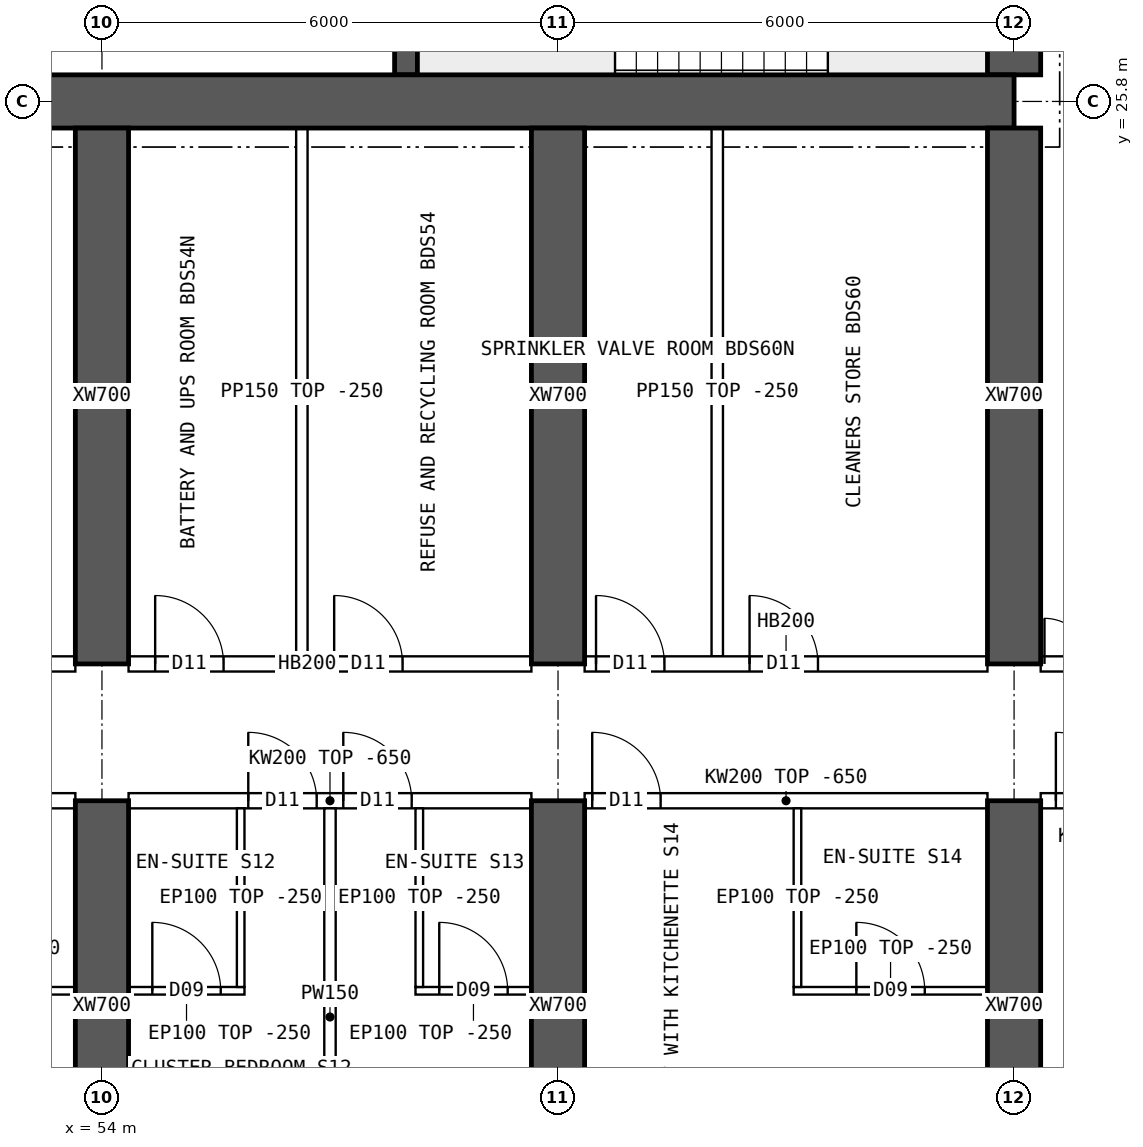
"""IFC4 building model, lengths in metres.
Left out: names, types, materials, properties, quantities, classifications, styles, units other than length and angle.
Written with IfcOpenShell. Run it as: python <this file> out.ifc"""

import sys

from ifc_helpers import new_model, si_unit, direction, frame, frame_2d, origin, place, context, subcontext, project, spatial, polyline, rectangle, outline, extrude, element, fill, save


model = new_model("IFC4")
c1 = context("Model", 3, precision=1e-05, world=origin(), true_north=direction((0.0, 1.0)))
c2 = subcontext(c1, "Body", "Model", "MODEL_VIEW")
j1 = project(units=[si_unit("LENGTHUNIT", "METRE"), si_unit("PLANEANGLEUNIT", "RADIAN")], contexts=[c1])
p1 = place(None, origin())
s1 = spatial("IfcSite", under=j1, at=p1, CompositionType="ELEMENT")
p2 = place(p1, origin())
s2 = spatial("IfcBuilding", under=s1, at=p2, CompositionType="ELEMENT")
p3 = place(p2, frame((0.0, 0.0, 216.55)))
s3 = spatial("IfcBuildingStorey", under=s2, at=p3, CompositionType="ELEMENT", Elevation=216.55)
p4 = place(p3, frame((18.0, 25.8, 0.0), z_axis=(0.0, 0.0, 1.0), x_axis=(1.0, 0.0, 0.0)))
e1 = element("IfcWall", 1, at=p4, inside=s3, PredefinedType="SHEAR", context=c2, shape_type="SweptSolid", body=[
    extrude(rectangle(XDim=48.0, YDim=0.7, at=frame_2d((24.0, 0.0))), origin(), (0.0, 0.0, 1.0), 3.75),
])
p5 = place(p3, frame((66.0, 26.15, 0.0), z_axis=(0.0, 0.0, 1.0), x_axis=(0.0, 1.0, 0.0)))
e2 = element("IfcWall", 2, at=p5, inside=s3, PredefinedType="SHEAR", context=c2, shape_type="SweptSolid", body=[
    extrude(rectangle(XDim=11.7, YDim=0.7, at=frame_2d((5.85, 0.0))), origin(), (0.0, 0.0, 1.0), 3.75),
])
p6 = place(p5, frame((5.15, 0.0, 0.0)))
e3 = element("IfcOpeningElement", 3, at=p6, cuts=e2, PredefinedType="OPENING", context=c2, shape_type="SweptSolid", body=[
    extrude(rectangle(XDim=1.2, YDim=2.1, at=frame_2d((0.6, 1.05))), frame((0.0, 0.36, 0.0), z_axis=(0.0, -1.0, 0.0), x_axis=(1.0, 0.0, 0.0)), (0.0, 0.0, 1.0), 0.72),
])
p7 = place(p3, frame((58.0, 26.15, 0.0), z_axis=(0.0, 0.0, 1.0), x_axis=(0.0, 1.0, 0.0)))
e4 = element("IfcWall", 4, at=p7, inside=s3, PredefinedType="SHEAR", context=c2, shape_type="SweptSolid", body=[
    extrude(rectangle(XDim=4.1, YDim=0.3, at=frame_2d((2.05, 0.0))), origin(), (0.0, 0.0, 1.0), 3.75),
])
p8 = place(p3, frame((54.0, 11.2, 0.0), z_axis=(0.0, 0.0, 1.0), x_axis=(0.0, 1.0, 0.0)))
e5 = element("IfcWall", 5, at=p8, inside=s3, PredefinedType="SHEAR", context=c2, shape_type="SweptSolid", body=[
    extrude(rectangle(XDim=5.4, YDim=0.7, at=frame_2d((2.7, 0.0))), origin(), (0.0, 0.0, 1.0), 3.75),
])
p9 = place(p3, frame((54.0, 18.4, 0.0), z_axis=(0.0, 0.0, 1.0), x_axis=(0.0, 1.0, 0.0)))
e6 = element("IfcWall", 6, at=p9, inside=s3, PredefinedType="SHEAR", context=c2, shape_type="SweptSolid", body=[
    extrude(rectangle(XDim=7.05, YDim=0.7, at=frame_2d((3.525, 0.0))), origin(), (0.0, 0.0, 1.0), 3.75),
])
p10 = place(p3, frame((60.0, 11.2, 0.0), z_axis=(0.0, 0.0, 1.0), x_axis=(0.0, 1.0, 0.0)))
e7 = element("IfcWall", 7, at=p10, inside=s3, PredefinedType="SHEAR", context=c2, shape_type="SweptSolid", body=[
    extrude(rectangle(XDim=5.4, YDim=0.7, at=frame_2d((2.7, 0.0))), origin(), (0.0, 0.0, 1.0), 3.75),
])
p11 = place(p3, frame((60.0, 18.4, 0.0), z_axis=(0.0, 0.0, 1.0), x_axis=(0.0, 1.0, 0.0)))
e8 = element("IfcWall", 8, at=p11, inside=s3, PredefinedType="SHEAR", context=c2, shape_type="SweptSolid", body=[
    extrude(rectangle(XDim=7.05, YDim=0.7, at=frame_2d((3.525, 0.0))), origin(), (0.0, 0.0, 1.0), 3.75),
])
p12 = place(p3, frame((66.0, 11.2, 0.0), z_axis=(0.0, 0.0, 1.0), x_axis=(0.0, 1.0, 0.0)))
e9 = element("IfcWall", 9, at=p12, inside=s3, PredefinedType="SHEAR", context=c2, shape_type="SweptSolid", body=[
    extrude(rectangle(XDim=5.4, YDim=0.7, at=frame_2d((2.7, 0.0))), origin(), (0.0, 0.0, 1.0), 3.75),
])
p13 = place(p3, frame((66.0, 18.4, 0.0), z_axis=(0.0, 0.0, 1.0), x_axis=(0.0, 1.0, 0.0)))
e10 = element("IfcWall", 10, at=p13, inside=s3, PredefinedType="SHEAR", context=c2, shape_type="SweptSolid", body=[
    extrude(rectangle(XDim=7.05, YDim=0.7, at=frame_2d((3.525, 0.0))), origin(), (0.0, 0.0, 1.0), 3.75),
])
p14 = place(p3, frame((48.35, 16.6, 0.0), z_axis=(0.0, 0.0, 1.0), x_axis=(1.0, 0.0, 0.0)))
e11 = element("IfcWall", 11, at=p14, inside=s3, PredefinedType="SOLIDWALL", context=c2, shape_type="SweptSolid", body=[
    extrude(outline(polyline([(0.0, 0.0), (5.3, 0.0), (5.3, 3.1), (0.0, 3.1), (0.0, 0.0)])), frame((0.0, 0.1, 0.0), z_axis=(0.0, -1.0, 0.0), x_axis=(1.0, 0.0, 0.0)), (0.0, 0.0, 1.0), 0.2),
])
p15 = place(p14, frame((0.1, 0.0, 0.0)))
e12 = element("IfcOpeningElement", 12, at=p15, cuts=e11, PredefinedType="OPENING", context=c2, shape_type="SweptSolid", body=[
    extrude(rectangle(XDim=0.9, YDim=2.1, at=frame_2d((0.45, 1.05))), frame((0.0, 0.11, 0.0), z_axis=(0.0, -1.0, 0.0), x_axis=(1.0, 0.0, 0.0)), (0.0, 0.0, 1.0), 0.22),
])
p16 = place(p3, frame((48.35, 18.4, 0.0), z_axis=(0.0, 0.0, 1.0), x_axis=(1.0, 0.0, 0.0)))
e13 = element("IfcWall", 13, at=p16, inside=s3, PredefinedType="SOLIDWALL", context=c2, shape_type="SweptSolid", body=[
    extrude(rectangle(XDim=5.3, YDim=0.2, at=frame_2d((2.65, 0.0))), origin(), (0.0, 0.0, 1.0), 3.5),
])
p17 = place(p16, frame((0.525, 0.0, 0.0)))
e14 = element("IfcOpeningElement", 14, at=p17, cuts=e13, PredefinedType="OPENING", context=c2, shape_type="SweptSolid", body=[
    extrude(rectangle(XDim=1.0, YDim=2.1, at=frame_2d((0.5, 1.05))), frame((0.0, 0.11, 0.0), z_axis=(0.0, -1.0, 0.0), x_axis=(1.0, 0.0, 0.0)), (0.0, 0.0, 1.0), 0.22),
])
p18 = place(p3, frame((54.35, 16.6, 0.0), z_axis=(0.0, 0.0, 1.0), x_axis=(1.0, 0.0, 0.0)))
e15 = element("IfcWall", 15, at=p18, inside=s3, PredefinedType="SOLIDWALL", context=c2, shape_type="SweptSolid", body=[
    extrude(outline(polyline([(0.0, 0.0), (5.3, 0.0), (5.3, 3.1), (0.0, 3.1), (0.0, 0.0)])), frame((0.0, 0.1, 0.0), z_axis=(0.0, -1.0, 0.0), x_axis=(1.0, 0.0, 0.0)), (0.0, 0.0, 1.0), 0.2),
])
p19 = place(p18, frame((1.575, 0.0, 0.0)))
e16 = element("IfcOpeningElement", 16, at=p19, cuts=e15, PredefinedType="OPENING", context=c2, shape_type="SweptSolid", body=[
    extrude(rectangle(XDim=0.9, YDim=2.1, at=frame_2d((0.45, 1.05))), frame((0.0, 0.11, 0.0), z_axis=(0.0, -1.0, 0.0), x_axis=(1.0, 0.0, 0.0)), (0.0, 0.0, 1.0), 0.22),
])
p20 = place(p18, frame((2.825, 0.0, 0.0)))
e17 = element("IfcOpeningElement", 17, at=p20, cuts=e15, PredefinedType="OPENING", context=c2, shape_type="SweptSolid", body=[
    extrude(rectangle(XDim=0.9, YDim=2.1, at=frame_2d((0.45, 1.05))), frame((0.0, 0.11, 0.0), z_axis=(0.0, -1.0, 0.0), x_axis=(1.0, 0.0, 0.0)), (0.0, 0.0, 1.0), 0.22),
])
p21 = place(p3, frame((54.35, 18.4, 0.0), z_axis=(0.0, 0.0, 1.0), x_axis=(1.0, 0.0, 0.0)))
e18 = element("IfcWall", 18, at=p21, inside=s3, PredefinedType="SOLIDWALL", context=c2, shape_type="SweptSolid", body=[
    extrude(rectangle(XDim=5.3, YDim=0.2, at=frame_2d((2.65, 0.0))), origin(), (0.0, 0.0, 1.0), 3.5),
])
p22 = place(p21, frame((0.35, 0.0, 0.0)))
e19 = element("IfcOpeningElement", 19, at=p22, cuts=e18, PredefinedType="OPENING", context=c2, shape_type="SweptSolid", body=[
    extrude(rectangle(XDim=0.9, YDim=2.1, at=frame_2d((0.45, 1.05))), frame((0.0, 0.11, 0.0), z_axis=(0.0, -1.0, 0.0), x_axis=(1.0, 0.0, 0.0)), (0.0, 0.0, 1.0), 0.22),
])
p23 = place(p21, frame((2.705, 0.0, 0.0)))
e20 = element("IfcOpeningElement", 20, at=p23, cuts=e18, PredefinedType="OPENING", context=c2, shape_type="SweptSolid", body=[
    extrude(rectangle(XDim=0.9, YDim=2.1, at=frame_2d((0.45, 1.05))), frame((0.0, 0.11, 0.0), z_axis=(0.0, -1.0, 0.0), x_axis=(1.0, 0.0, 0.0)), (0.0, 0.0, 1.0), 0.22),
])
p24 = place(p3, frame((60.35, 16.6, 0.0), z_axis=(0.0, 0.0, 1.0), x_axis=(1.0, 0.0, 0.0)))
e21 = element("IfcWall", 21, at=p24, inside=s3, PredefinedType="SOLIDWALL", context=c2, shape_type="SweptSolid", body=[
    extrude(outline(polyline([(0.0, 0.0), (5.3, 0.0), (5.3, 3.1), (0.0, 3.1), (0.0, 0.0)])), frame((0.0, 0.1, 0.0), z_axis=(0.0, -1.0, 0.0), x_axis=(1.0, 0.0, 0.0)), (0.0, 0.0, 1.0), 0.2),
])
p25 = place(p24, frame((0.1, 0.0, 0.0)))
e22 = element("IfcOpeningElement", 22, at=p25, cuts=e21, PredefinedType="OPENING", context=c2, shape_type="SweptSolid", body=[
    extrude(rectangle(XDim=0.9, YDim=2.1, at=frame_2d((0.45, 1.05))), frame((0.0, 0.11, 0.0), z_axis=(0.0, -1.0, 0.0), x_axis=(1.0, 0.0, 0.0)), (0.0, 0.0, 1.0), 0.22),
])
p26 = place(p3, frame((60.35, 18.4, 0.0), z_axis=(0.0, 0.0, 1.0), x_axis=(1.0, 0.0, 0.0)))
e23 = element("IfcWall", 23, at=p26, inside=s3, PredefinedType="SOLIDWALL", context=c2, shape_type="SweptSolid", body=[
    extrude(rectangle(XDim=5.3, YDim=0.2, at=frame_2d((2.65, 0.0))), origin(), (0.0, 0.0, 1.0), 3.5),
])
p27 = place(p26, frame((0.15, 0.0, 0.0)))
e24 = element("IfcOpeningElement", 24, at=p27, cuts=e23, PredefinedType="OPENING", context=c2, shape_type="SweptSolid", body=[
    extrude(rectangle(XDim=0.9, YDim=2.1, at=frame_2d((0.45, 1.05))), frame((0.0, 0.11, 0.0), z_axis=(0.0, -1.0, 0.0), x_axis=(1.0, 0.0, 0.0)), (0.0, 0.0, 1.0), 0.22),
])
p28 = place(p26, frame((2.17, 0.0, 0.0)))
e25 = element("IfcOpeningElement", 25, at=p28, cuts=e23, PredefinedType="OPENING", context=c2, shape_type="SweptSolid", body=[
    extrude(rectangle(XDim=0.9, YDim=2.1, at=frame_2d((0.45, 1.05))), frame((0.0, 0.11, 0.0), z_axis=(0.0, -1.0, 0.0), x_axis=(1.0, 0.0, 0.0)), (0.0, 0.0, 1.0), 0.22),
])
p29 = place(p3, frame((66.35, 16.6, 0.0), z_axis=(0.0, 0.0, 1.0), x_axis=(1.0, 0.0, 0.0)))
e26 = element("IfcWall", 26, at=p29, inside=s3, PredefinedType="SOLIDWALL", context=c2, shape_type="SweptSolid", body=[
    extrude(rectangle(XDim=2.05, YDim=0.2, at=frame_2d((1.025, 0.0))), origin(), (0.0, 0.0, 1.0), 3.5),
])
p30 = place(p29, frame((0.2, 0.0, 0.0)))
e27 = element("IfcOpeningElement", 27, at=p30, cuts=e26, PredefinedType="OPENING", context=c2, shape_type="SweptSolid", body=[
    extrude(rectangle(XDim=0.9, YDim=2.1, at=frame_2d((0.45, 1.05))), frame((0.0, 0.11, 0.0), z_axis=(0.0, -1.0, 0.0), x_axis=(1.0, 0.0, 0.0)), (0.0, 0.0, 1.0), 0.22),
])
p31 = place(p3, frame((66.35, 18.4, 0.0), z_axis=(0.0, 0.0, 1.0), x_axis=(1.0, 0.0, 0.0)))
e28 = element("IfcWall", 28, at=p31, inside=s3, PredefinedType="SOLIDWALL", context=c2, shape_type="SweptSolid", body=[
    extrude(rectangle(XDim=2.05, YDim=0.2, at=frame_2d((1.025, 0.0))), origin(), (0.0, 0.0, 1.0), 3.5),
])
p32 = place(p31, frame((0.05, 0.0, 0.0)))
e29 = element("IfcOpeningElement", 29, at=p32, cuts=e28, PredefinedType="OPENING", context=c2, shape_type="SweptSolid", body=[
    extrude(rectangle(XDim=1.2, YDim=2.1, at=frame_2d((0.6, 1.05))), frame((0.0, 0.11, 0.0), z_axis=(0.0, -1.0, 0.0), x_axis=(1.0, 0.0, 0.0)), (0.0, 0.0, 1.0), 0.22),
])
p33 = place(p3, frame((53.65, 14.1, 0.0), z_axis=(0.0, 0.0, 1.0), x_axis=(-1.0, 0.0, 0.0)))
e30 = element("IfcWall", 30, at=p33, inside=s3, PredefinedType="PARTITIONING", context=c2, shape_type="SweptSolid", body=[
    extrude(rectangle(XDim=2.55, YDim=0.1, at=frame_2d((1.275, 0.0))), origin(), (0.0, 0.0, 1.0), 3.5),
])
p34 = place(p33, frame((0.825, 0.0, 0.0)))
e31 = element("IfcOpeningElement", 31, at=p34, cuts=e30, PredefinedType="OPENING", context=c2, shape_type="SweptSolid", body=[
    extrude(rectangle(XDim=0.9, YDim=2.1, at=frame_2d((0.45, 1.05))), frame((0.0, 0.06, 0.0), z_axis=(0.0, -1.0, 0.0), x_axis=(1.0, 0.0, 0.0)), (0.0, 0.0, 1.0), 0.12),
])
p35 = place(p3, frame((57.0, 11.01, 0.0), z_axis=(0.0, 0.0, 1.0), x_axis=(0.0, 1.0, 0.0)))
e32 = element("IfcWall", 32, at=p35, inside=s3, PredefinedType="PARTITIONING", context=c2, shape_type="SweptSolid", body=[
    extrude(outline(polyline([(0.0, 0.0), (5.49, 0.0), (5.49, 3.1), (5.442, 3.1), (5.44, 3.5), (0.792, 3.5), (0.79, 3.1), (0.392, 3.1), (0.39, 3.5), (0.0, 3.5), (0.0, 0.0)])), frame((0.0, 0.075, 0.0), z_axis=(0.0, -1.0, 0.0), x_axis=(1.0, 0.0, 0.0)), (0.0, 0.0, 1.0), 0.15),
])
p36 = place(p3, frame((55.875, 14.1, 0.0), z_axis=(0.0, 0.0, 1.0), x_axis=(-1.0, 0.0, 0.0)))
e33 = element("IfcWall", 33, at=p36, inside=s3, PredefinedType="PARTITIONING", context=c2, shape_type="SweptSolid", body=[
    extrude(rectangle(XDim=1.525, YDim=0.1, at=frame_2d((0.762, 0.0))), origin(), (0.0, 0.0, 1.0), 3.5),
])
p37 = place(p36, frame((0.312, 0.0, 0.0)))
e34 = element("IfcOpeningElement", 34, at=p37, cuts=e33, PredefinedType="OPENING", context=c2, shape_type="SweptSolid", body=[
    extrude(rectangle(XDim=0.9, YDim=2.1, at=frame_2d((0.45, 1.05))), frame((0.0, 0.06, 0.0), z_axis=(0.0, -1.0, 0.0), x_axis=(1.0, 0.0, 0.0)), (0.0, 0.0, 1.0), 0.12),
])
p38 = place(p3, frame((55.825, 14.15, 0.0), z_axis=(0.0, 0.0, 1.0), x_axis=(0.0, 1.0, 0.0)))
e35 = element("IfcWall", 35, at=p38, inside=s3, PredefinedType="PARTITIONING", context=c2, shape_type="SweptSolid", body=[
    extrude(outline(polyline([(0.0, 0.0), (2.35, 0.0), (2.35, 3.1), (2.302, 3.1), (2.3, 3.5), (0.0, 3.5), (0.0, 0.0)])), frame((0.0, 0.05, 0.0), z_axis=(0.0, -1.0, 0.0), x_axis=(1.0, 0.0, 0.0)), (0.0, 0.0, 1.0), 0.1),
])
p39 = place(p3, frame((59.65, 14.1, 0.0), z_axis=(0.0, 0.0, 1.0), x_axis=(-1.0, 0.0, 0.0)))
e36 = element("IfcWall", 36, at=p39, inside=s3, PredefinedType="PARTITIONING", context=c2, shape_type="SweptSolid", body=[
    extrude(rectangle(XDim=1.525, YDim=0.1, at=frame_2d((0.762, 0.0))), origin(), (0.0, 0.0, 1.0), 3.5),
])
p40 = place(p39, frame((0.312, 0.0, 0.0)))
e37 = element("IfcOpeningElement", 37, at=p40, cuts=e36, PredefinedType="OPENING", context=c2, shape_type="SweptSolid", body=[
    extrude(rectangle(XDim=0.9, YDim=2.1, at=frame_2d((0.45, 1.05))), frame((0.0, 0.06, 0.0), z_axis=(0.0, -1.0, 0.0), x_axis=(1.0, 0.0, 0.0)), (0.0, 0.0, 1.0), 0.12),
])
p41 = place(p3, frame((58.175, 14.15, 0.0), z_axis=(0.0, 0.0, 1.0), x_axis=(0.0, 1.0, 0.0)))
e38 = element("IfcWall", 38, at=p41, inside=s3, PredefinedType="PARTITIONING", context=c2, shape_type="SweptSolid", body=[
    extrude(outline(polyline([(0.0, 0.0), (2.35, 0.0), (2.35, 3.1), (2.302, 3.1), (2.3, 3.5), (0.0, 3.5), (0.0, 0.0)])), frame((0.0, 0.05, 0.0), z_axis=(0.0, -1.0, 0.0), x_axis=(1.0, 0.0, 0.0)), (0.0, 0.0, 1.0), 0.1),
])
p42 = place(p3, frame((65.65, 14.1, 0.0), z_axis=(0.0, 0.0, 1.0), x_axis=(-1.0, 0.0, 0.0)))
e39 = element("IfcWall", 39, at=p42, inside=s3, PredefinedType="PARTITIONING", context=c2, shape_type="SweptSolid", body=[
    extrude(rectangle(XDim=2.55, YDim=0.1, at=frame_2d((1.275, 0.0))), origin(), (0.0, 0.0, 1.0), 3.5),
])
p43 = place(p42, frame((0.825, 0.0, 0.0)))
e40 = element("IfcOpeningElement", 40, at=p43, cuts=e39, PredefinedType="OPENING", context=c2, shape_type="SweptSolid", body=[
    extrude(rectangle(XDim=0.9, YDim=2.1, at=frame_2d((0.45, 1.05))), frame((0.0, 0.06, 0.0), z_axis=(0.0, -1.0, 0.0), x_axis=(1.0, 0.0, 0.0)), (0.0, 0.0, 1.0), 0.12),
])
p44 = place(p3, frame((63.15, 14.15, 0.0), z_axis=(0.0, 0.0, 1.0), x_axis=(0.0, 1.0, 0.0)))
e41 = element("IfcWall", 41, at=p44, inside=s3, PredefinedType="PARTITIONING", context=c2, shape_type="SweptSolid", body=[
    extrude(outline(polyline([(0.0, 0.0), (2.35, 0.0), (2.35, 3.1), (2.302, 3.1), (2.3, 3.5), (0.0, 3.5), (0.0, 0.0)])), frame((0.0, 0.05, 0.0), z_axis=(0.0, -1.0, 0.0), x_axis=(1.0, 0.0, 0.0)), (0.0, 0.0, 1.0), 0.1),
])
for number, where, z_axis, x_axis in (
    (42, (56.63, 18.5, 0.0), (0.0, 0.0, 1.0), (0.0, 1.0, 0.0)),
    (43, (62.095, 18.5, 0.0), (0.0, 0.0, 1.0), (0.0, 1.0, 0.0)),
):
    element("IfcWall", number, at=place(p3, frame(where, z_axis=z_axis, x_axis=x_axis)), inside=s3, PredefinedType="PARTITIONING", context=c2, shape_type="SweptSolid", body=[
        extrude(rectangle(XDim=6.95, YDim=0.15, at=frame_2d((3.475, 0.0))), origin(), (0.0, 0.0, 1.0), 3.5),
    ])
p45 = place(p32, origin())
e44 = element("IfcDoor", 44, at=p45, inside=s3, OperationType="DOUBLE_DOOR_SINGLE_SWING", PredefinedType="DOOR", context=c2, shape_type="SweptSolid", body=[
    extrude(rectangle(XDim=1.2, YDim=2.1, at=frame_2d((0.6, 1.05))), frame((0.0, 0.025, 0.0), z_axis=(0.0, -1.0, 0.0), x_axis=(1.0, 0.0, 0.0)), (0.0, 0.0, 1.0), 0.05),
])
fill(e29, e44)
p46 = place(p37, origin())
e45 = element("IfcDoor", 45, at=p46, inside=s3, OperationType="SINGLE_SWING_RIGHT", PredefinedType="DOOR", context=c2, shape_type="SweptSolid", body=[
    extrude(rectangle(XDim=0.9, YDim=2.1, at=frame_2d((0.45, 1.05))), frame((0.0, 0.025, 0.0), z_axis=(0.0, -1.0, 0.0), x_axis=(1.0, 0.0, 0.0)), (0.0, 0.0, 1.0), 0.05),
])
fill(e34, e45)
p47 = place(p19, origin())
e46 = element("IfcDoor", 46, at=p47, inside=s3, OperationType="SINGLE_SWING_LEFT", PredefinedType="DOOR", context=c2, shape_type="SweptSolid", body=[
    extrude(rectangle(XDim=0.9, YDim=2.1, at=frame_2d((0.45, 1.05))), frame((0.0, 0.025, 0.0), z_axis=(0.0, -1.0, 0.0), x_axis=(1.0, 0.0, 0.0)), (0.0, 0.0, 1.0), 0.05),
])
fill(e16, e46)
p48 = place(p40, origin())
e47 = element("IfcDoor", 47, at=p48, inside=s3, OperationType="SINGLE_SWING_RIGHT", PredefinedType="DOOR", context=c2, shape_type="SweptSolid", body=[
    extrude(rectangle(XDim=0.9, YDim=2.1, at=frame_2d((0.45, 1.05))), frame((0.0, 0.025, 0.0), z_axis=(0.0, -1.0, 0.0), x_axis=(1.0, 0.0, 0.0)), (0.0, 0.0, 1.0), 0.05),
])
fill(e37, e47)
p49 = place(p20, origin())
e48 = element("IfcDoor", 48, at=p49, inside=s3, OperationType="SINGLE_SWING_LEFT", PredefinedType="DOOR", context=c2, shape_type="SweptSolid", body=[
    extrude(rectangle(XDim=0.9, YDim=2.1, at=frame_2d((0.45, 1.05))), frame((0.0, 0.025, 0.0), z_axis=(0.0, -1.0, 0.0), x_axis=(1.0, 0.0, 0.0)), (0.0, 0.0, 1.0), 0.05),
])
fill(e17, e48)
p50 = place(p43, origin())
e49 = element("IfcDoor", 49, at=p50, inside=s3, OperationType="SINGLE_SWING_RIGHT", PredefinedType="DOOR", context=c2, shape_type="SweptSolid", body=[
    extrude(rectangle(XDim=0.9, YDim=2.1, at=frame_2d((0.45, 1.05))), frame((0.0, 0.025, 0.0), z_axis=(0.0, -1.0, 0.0), x_axis=(1.0, 0.0, 0.0)), (0.0, 0.0, 1.0), 0.05),
])
fill(e40, e49)
p51 = place(p25, origin())
e50 = element("IfcDoor", 50, at=p51, inside=s3, OperationType="SINGLE_SWING_LEFT", PredefinedType="DOOR", context=c2, shape_type="SweptSolid", body=[
    extrude(rectangle(XDim=0.9, YDim=2.1, at=frame_2d((0.45, 1.05))), frame((0.0, 0.025, 0.0), z_axis=(0.0, -1.0, 0.0), x_axis=(1.0, 0.0, 0.0)), (0.0, 0.0, 1.0), 0.05),
])
fill(e22, e50)
p52 = place(p22, origin())
e51 = element("IfcDoor", 51, at=p52, inside=s3, OperationType="SINGLE_SWING_LEFT", PredefinedType="DOOR", context=c2, shape_type="SweptSolid", body=[
    extrude(rectangle(XDim=0.9, YDim=2.1, at=frame_2d((0.45, 1.05))), frame((0.0, 0.025, 0.0), z_axis=(0.0, -1.0, 0.0), x_axis=(1.0, 0.0, 0.0)), (0.0, 0.0, 1.0), 0.05),
])
fill(e19, e51)
p53 = place(p23, origin())
e52 = element("IfcDoor", 52, at=p53, inside=s3, OperationType="SINGLE_SWING_LEFT", PredefinedType="DOOR", context=c2, shape_type="SweptSolid", body=[
    extrude(rectangle(XDim=0.9, YDim=2.1, at=frame_2d((0.45, 1.05))), frame((0.0, 0.025, 0.0), z_axis=(0.0, -1.0, 0.0), x_axis=(1.0, 0.0, 0.0)), (0.0, 0.0, 1.0), 0.05),
])
fill(e20, e52)
p54 = place(p27, origin())
e53 = element("IfcDoor", 53, at=p54, inside=s3, OperationType="SINGLE_SWING_LEFT", PredefinedType="DOOR", context=c2, shape_type="SweptSolid", body=[
    extrude(rectangle(XDim=0.9, YDim=2.1, at=frame_2d((0.45, 1.05))), frame((0.0, 0.025, 0.0), z_axis=(0.0, -1.0, 0.0), x_axis=(1.0, 0.0, 0.0)), (0.0, 0.0, 1.0), 0.05),
])
fill(e24, e53)
p55 = place(p28, origin())
e54 = element("IfcDoor", 54, at=p55, inside=s3, OperationType="SINGLE_SWING_LEFT", PredefinedType="DOOR", context=c2, shape_type="SweptSolid", body=[
    extrude(rectangle(XDim=0.9, YDim=2.1, at=frame_2d((0.45, 1.05))), frame((0.0, 0.025, 0.0), z_axis=(0.0, -1.0, 0.0), x_axis=(1.0, 0.0, 0.0)), (0.0, 0.0, 1.0), 0.05),
])
fill(e25, e54)
p56 = place(p30, origin())
e55 = element("IfcDoor", 55, at=p56, inside=s3, OperationType="SINGLE_SWING_LEFT", PredefinedType="DOOR", context=c2, shape_type="SweptSolid", body=[
    extrude(rectangle(XDim=0.9, YDim=2.1, at=frame_2d((0.45, 1.05))), frame((0.0, 0.025, 0.0), z_axis=(0.0, -1.0, 0.0), x_axis=(1.0, 0.0, 0.0)), (0.0, 0.0, 1.0), 0.05),
])
fill(e27, e55)
save(model, sys.argv[1])
